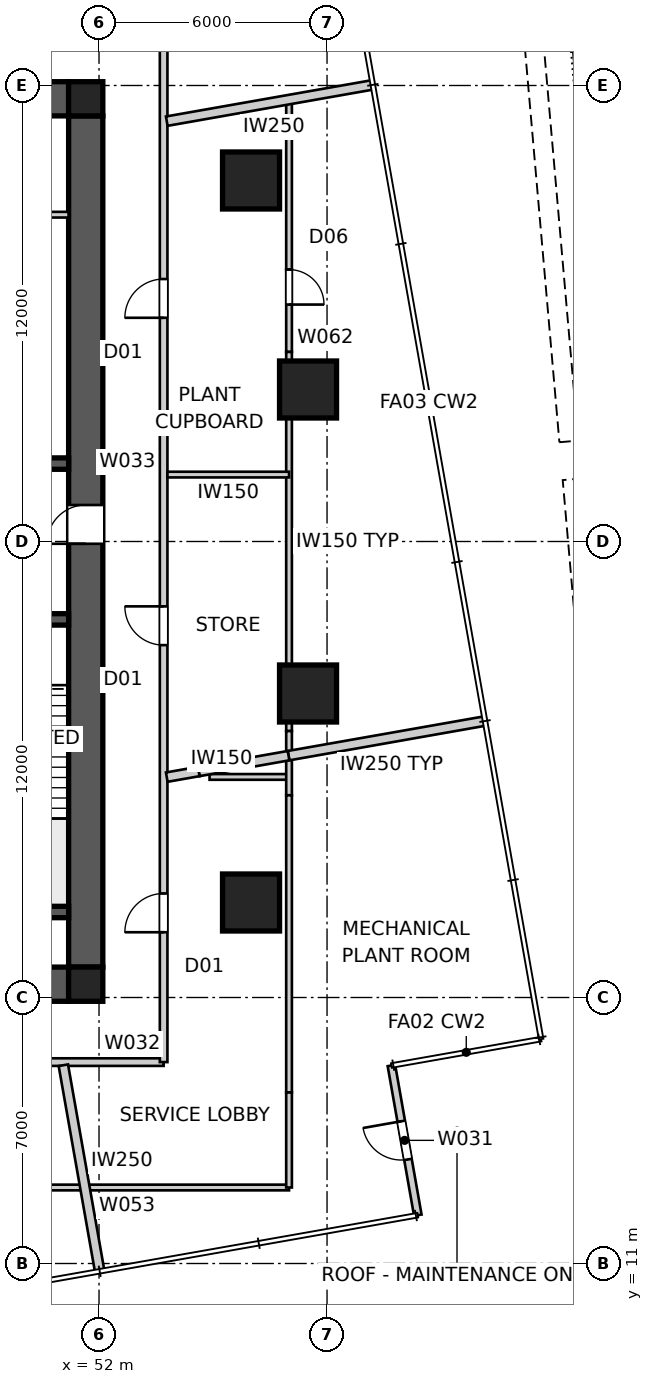
"""IFC4 building model, lengths in metres.
Left out: names, types, materials, properties, quantities, classifications, styles, units other than length and angle.
Written with IfcOpenShell. Run it as: python <this file> out.ifc"""

import sys

from ifc_helpers import new_model, si_unit, direction, frame, frame_2d, origin, origin_2d, place, context, subcontext, project, spatial, polyline, rectangle, outline, extrude, element, fill, save


model = new_model("IFC4")
c1 = context("Model", 3, precision=1e-05, world=origin(), true_north=direction((0.0, 1.0)))
c2 = subcontext(c1, "Body", "Model", "MODEL_VIEW")
j1 = project(units=[si_unit("LENGTHUNIT", "METRE"), si_unit("PLANEANGLEUNIT", "RADIAN")], contexts=[c1])
p1 = place(None, origin())
s1 = spatial("IfcSite", under=j1, at=p1, CompositionType="ELEMENT")
p2 = place(p1, origin())
s2 = spatial("IfcBuilding", under=s1, at=p2, CompositionType="ELEMENT")
p3 = place(p2, frame((0.0, 0.0, 74.4)))
s3 = spatial("IfcBuildingStorey", under=s2, at=p3, CompositionType="ELEMENT", Elevation=74.4)
for number, where, z_axis, x_axis in (
    (1, (28.8, 41.65, 0.0), (0.0, 0.0, 1.0), (1.0, 0.0, 0.0)),
    (2, (51.2, 18.35, 0.0), (0.0, 0.0, 1.0), (-1.0, 0.0, 0.0)),
):
    element("IfcWall", number, at=place(p3, frame(where, z_axis=z_axis, x_axis=x_axis)), inside=s3, PredefinedType="SHEAR", context=c2, shape_type="SweptSolid", body=[
        extrude(outline(polyline([(0.0, -0.45), (22.4, -0.45), (22.4, -0.025), (22.85, -0.025), (22.85, 0.025), (22.4, 0.025), (22.4, 0.45), (0.0, 0.45), (0.0, 0.025), (-0.45, 0.025), (-0.45, -0.025), (0.0, -0.025), (0.0, -0.45)])), origin(), (0.0, 0.0, 1.0), 5.0),
    ])
p4 = place(p3, frame((51.65, 18.8, 0.0), z_axis=(0.0, 0.0, 1.0), x_axis=(0.0, 1.0, 0.0)))
e3 = element("IfcWall", 3, at=p4, inside=s3, PredefinedType="SHEAR", context=c2, shape_type="SweptSolid", body=[
    extrude(outline(polyline([(0.0, -0.45), (22.4, -0.45), (22.4, -0.025), (22.85, -0.025), (22.85, 0.025), (22.4, 0.025), (22.4, 0.45), (0.0, 0.45), (0.0, 0.025), (-0.45, 0.025), (-0.45, -0.025), (0.0, -0.025), (0.0, -0.45)])), origin(), (0.0, 0.0, 1.0), 5.0),
])
p5 = place(p4, frame((11.14, 0.0, 0.0)))
e4 = element("IfcOpeningElement", 4, at=p5, cuts=e3, PredefinedType="OPENING", context=c2, shape_type="SweptSolid", body=[
    extrude(rectangle(XDim=1.02, YDim=2.4, at=frame_2d((0.51, 1.2))), frame((0.0, 0.46, 0.0), z_axis=(0.0, -1.0, 0.0), x_axis=(1.0, 0.0, 0.0)), (0.0, 0.0, 1.0), 0.92),
])
p6 = place(p3, frame((28.8, 32.05, 0.0), z_axis=(0.0, 0.0, 1.0), x_axis=(1.0, 0.0, 0.0)))
e5 = element("IfcWall", 5, at=p6, inside=s3, PredefinedType="SHEAR", context=c2, shape_type="SweptSolid", body=[
    extrude(rectangle(XDim=22.4, YDim=0.3, at=frame_2d((11.2, 0.0))), origin(), (0.0, 0.0, 1.0), 5.0),
])
p7 = place(p6, frame((19.04, 0.0, 0.0)))
e6 = element("IfcOpeningElement", 6, at=p7, cuts=e5, PredefinedType="OPENING", context=c2, shape_type="SweptSolid", body=[
    extrude(rectangle(XDim=0.92, YDim=2.1, at=frame_2d((0.46, 1.05))), frame((0.0, 0.16, 0.0), z_axis=(0.0, -1.0, 0.0), x_axis=(1.0, 0.0, 0.0)), (0.0, 0.0, 1.0), 0.32),
])
p8 = place(p6, frame((1.265, 0.0, 0.0)))
e7 = element("IfcOpeningElement", 7, at=p8, cuts=e5, PredefinedType="OPENING", context=c2, shape_type="SweptSolid", body=[
    extrude(rectangle(XDim=1.02, YDim=2.1, at=frame_2d((0.51, 1.05))), frame((0.0, 0.16, 0.0), z_axis=(0.0, -1.0, 0.0), x_axis=(1.0, 0.0, 0.0)), (0.0, 0.0, 1.0), 0.32),
])
p9 = place(p6, frame((4.015, 0.0, 0.0)))
e8 = element("IfcOpeningElement", 8, at=p9, cuts=e5, PredefinedType="OPENING", context=c2, shape_type="SweptSolid", body=[
    extrude(rectangle(XDim=0.92, YDim=2.1, at=frame_2d((0.46, 1.05))), frame((0.0, 0.16, 0.0), z_axis=(0.0, -1.0, 0.0), x_axis=(1.0, 0.0, 0.0)), (0.0, 0.0, 1.0), 0.32),
])
p10 = place(p6, frame((6.45, 0.0, 0.0)))
e9 = element("IfcOpeningElement", 9, at=p10, cuts=e5, PredefinedType="OPENING", context=c2, shape_type="SweptSolid", body=[
    extrude(rectangle(XDim=1.1, YDim=2.1, at=frame_2d((0.55, 1.05))), frame((0.0, 0.16, 0.0), z_axis=(0.0, -1.0, 0.0), x_axis=(1.0, 0.0, 0.0)), (0.0, 0.0, 1.0), 0.32),
])
p11 = place(p6, frame((9.25, 0.0, 0.0)))
e10 = element("IfcOpeningElement", 10, at=p11, cuts=e5, PredefinedType="OPENING", context=c2, shape_type="SweptSolid", body=[
    extrude(rectangle(XDim=1.1, YDim=2.1, at=frame_2d((0.55, 1.05))), frame((0.0, 0.16, 0.0), z_axis=(0.0, -1.0, 0.0), x_axis=(1.0, 0.0, 0.0)), (0.0, 0.0, 1.0), 0.32),
])
p12 = place(p6, frame((14.85, 0.0, 0.0)))
e11 = element("IfcOpeningElement", 11, at=p12, cuts=e5, PredefinedType="OPENING", context=c2, shape_type="SweptSolid", body=[
    extrude(rectangle(XDim=1.1, YDim=2.1, at=frame_2d((0.55, 1.05))), frame((0.0, 0.16, 0.0), z_axis=(0.0, -1.0, 0.0), x_axis=(1.0, 0.0, 0.0)), (0.0, 0.0, 1.0), 0.32),
])
p13 = place(p3, frame((51.2, 27.95, 0.0), z_axis=(0.0, 0.0, 1.0), x_axis=(-1.0, 0.0, 0.0)))
e12 = element("IfcWall", 12, at=p13, inside=s3, PredefinedType="SHEAR", context=c2, shape_type="SweptSolid", body=[
    extrude(rectangle(XDim=22.4, YDim=0.3, at=frame_2d((11.2, 0.0))), origin(), (0.0, 0.0, 1.0), 5.0),
])
p14 = place(p13, frame((19.04, 0.0, 0.0)))
e13 = element("IfcOpeningElement", 13, at=p14, cuts=e12, PredefinedType="OPENING", context=c2, shape_type="SweptSolid", body=[
    extrude(rectangle(XDim=0.92, YDim=2.1, at=frame_2d((0.46, 1.05))), frame((0.0, 0.16, 0.0), z_axis=(0.0, -1.0, 0.0), x_axis=(1.0, 0.0, 0.0)), (0.0, 0.0, 1.0), 0.32),
])
p15 = place(p13, frame((1.265, 0.0, 0.0)))
e14 = element("IfcOpeningElement", 14, at=p15, cuts=e12, PredefinedType="OPENING", context=c2, shape_type="SweptSolid", body=[
    extrude(rectangle(XDim=1.02, YDim=2.1, at=frame_2d((0.51, 1.05))), frame((0.0, 0.16, 0.0), z_axis=(0.0, -1.0, 0.0), x_axis=(1.0, 0.0, 0.0)), (0.0, 0.0, 1.0), 0.32),
])
p16 = place(p13, frame((4.015, 0.0, 0.0)))
e15 = element("IfcOpeningElement", 15, at=p16, cuts=e12, PredefinedType="OPENING", context=c2, shape_type="SweptSolid", body=[
    extrude(rectangle(XDim=0.92, YDim=2.1, at=frame_2d((0.46, 1.05))), frame((0.0, 0.16, 0.0), z_axis=(0.0, -1.0, 0.0), x_axis=(1.0, 0.0, 0.0)), (0.0, 0.0, 1.0), 0.32),
])
p17 = place(p13, frame((14.85, 0.0, 0.0)))
e16 = element("IfcOpeningElement", 16, at=p17, cuts=e12, PredefinedType="OPENING", context=c2, shape_type="SweptSolid", body=[
    extrude(rectangle(XDim=1.1, YDim=2.1, at=frame_2d((0.55, 1.05))), frame((0.0, 0.16, 0.0), z_axis=(0.0, -1.0, 0.0), x_axis=(1.0, 0.0, 0.0)), (0.0, 0.0, 1.0), 0.32),
])
p18 = place(p3, frame((51.2, 20.25, 0.0), z_axis=(0.0, 0.0, 1.0), x_axis=(-1.0, 0.0, 0.0)))
e17 = element("IfcWall", 17, at=p18, inside=s3, PredefinedType="SHEAR", context=c2, shape_type="SweptSolid", body=[
    extrude(rectangle(XDim=3.5, YDim=0.3, at=frame_2d((1.75, 0.0))), origin(), (0.0, 0.0, 1.0), 5.0),
])
for number, where, z_axis, x_axis in (
    (18, (51.65, 18.35, 0.0), (0.0, 0.0, 1.0), (1.0, 0.0, 0.0)),
    (19, (51.65, 41.65, 0.0), (0.0, 0.0, 1.0), (1.0, 0.0, 0.0)),
):
    element("IfcColumn", number, at=place(p3, frame(where, z_axis=z_axis, x_axis=x_axis)), inside=s3, PredefinedType="COLUMN", context=c2, shape_type="SweptSolid", body=[
        extrude(rectangle(XDim=0.9, YDim=0.9, at=origin_2d()), origin(), (0.0, 0.0, 1.0), 5.0),
    ])
for number, where, z_axis, x_axis in (
    (20, (57.5, 26.0, 0.0), (0.0, 0.0, 1.0), (1.0, 0.0, 0.0)),
    (21, (57.5, 34.0, 0.0), (0.0, 0.0, 1.0), (1.0, 0.0, 0.0)),
    (22, (56.0, 39.5, 0.0), (0.0, 0.0, 1.0), (1.0, 0.0, 0.0)),
    (23, (56.0, 20.5, 0.0), (0.0, 0.0, 1.0), (1.0, 0.0, 0.0)),
):
    element("IfcColumn", number, at=place(p3, frame(where, z_axis=z_axis, x_axis=x_axis)), inside=s3, PredefinedType="COLUMN", context=c2, shape_type="SweptSolid", body=[
        extrude(rectangle(XDim=1.5, YDim=1.5, at=origin_2d()), origin(), (0.0, 0.0, 1.0), 5.0),
    ])
p19 = place(p3, frame((60.388, 12.271, 0.0), z_axis=(0.0, 0.0, 1.0), x_axis=(-0.173646056486, 0.984808127031, 0.0)))
e24 = element("IfcWall", 24, at=p19, inside=s3, PredefinedType="SOLIDWALL", context=c2, shape_type="SweptSolid", body=[
    extrude(rectangle(XDim=4.0, YDim=0.2, at=frame_2d((2.0, 0.0))), origin(), (0.0, 0.0, 1.0), 4.85),
])
p20 = place(p19, frame((1.49, 0.0, 0.0)))
e25 = element("IfcOpeningElement", 25, at=p20, cuts=e24, PredefinedType="OPENING", context=c2, shape_type="SweptSolid", body=[
    extrude(rectangle(XDim=1.02, YDim=2.1, at=frame_2d((0.51, 1.05))), frame((0.0, 0.11, 0.0), z_axis=(0.0, -1.0, 0.0), x_axis=(1.0, 0.0, 0.0)), (0.0, 0.0, 1.0), 0.22),
])
p21 = place(p3, frame((26.3, 16.3, 0.0), z_axis=(0.0, 0.0, 1.0), x_axis=(1.0, 0.0, 0.0)))
e26 = element("IfcWall", 26, at=p21, inside=s3, PredefinedType="PARTITIONING", context=c2, shape_type="SweptSolid", body=[
    extrude(rectangle(XDim=27.4, YDim=0.2, at=frame_2d((13.7, 0.0))), origin(), (0.0, 0.0, 1.0), 4.85),
])
p22 = place(p21, frame((20.916, 0.0, 0.0)))
e27 = element("IfcOpeningElement", 27, at=p22, cuts=e26, PredefinedType="OPENING", context=c2, shape_type="SweptSolid", body=[
    extrude(rectangle(XDim=1.02, YDim=2.34, at=frame_2d((0.51, 1.17))), frame((0.0, 0.11, 0.0), z_axis=(0.0, -1.0, 0.0), x_axis=(1.0, 0.0, 0.0)), (0.0, 0.0, 1.0), 0.22),
])
p23 = place(p21, frame((9.684, 0.0, 0.0)))
e28 = element("IfcOpeningElement", 28, at=p23, cuts=e26, PredefinedType="OPENING", context=c2, shape_type="SweptSolid", body=[
    extrude(rectangle(XDim=1.02, YDim=2.34, at=frame_2d((0.51, 1.17))), frame((0.0, 0.11, 0.0), z_axis=(0.0, -1.0, 0.0), x_axis=(1.0, 0.0, 0.0)), (0.0, 0.0, 1.0), 0.22),
])
p24 = place(p21, frame((15.011, 0.0, 0.0)))
e29 = element("IfcOpeningElement", 29, at=p24, cuts=e26, PredefinedType="OPENING", context=c2, shape_type="SweptSolid", body=[
    extrude(rectangle(XDim=1.02, YDim=2.34, at=frame_2d((0.51, 1.17))), frame((0.0, 0.11, 0.0), z_axis=(0.0, -1.0, 0.0), x_axis=(1.0, 0.0, 0.0)), (0.0, 0.0, 1.0), 0.22),
])
p25 = place(p21, frame((2.604, 0.0, 0.0)))
e30 = element("IfcOpeningElement", 30, at=p25, cuts=e26, PredefinedType="OPENING", context=c2, shape_type="SweptSolid", body=[
    extrude(rectangle(XDim=1.02, YDim=2.34, at=frame_2d((0.51, 1.17))), frame((0.0, 0.11, 0.0), z_axis=(0.0, -1.0, 0.0), x_axis=(1.0, 0.0, 0.0)), (0.0, 0.0, 1.0), 0.22),
])
p26 = place(p21, frame((5.968, 0.0, 0.0)))
e31 = element("IfcOpeningElement", 31, at=p26, cuts=e26, PredefinedType="OPENING", context=c2, shape_type="SweptSolid", body=[
    extrude(rectangle(XDim=1.02, YDim=2.34, at=frame_2d((0.51, 1.17))), frame((0.0, 0.11, 0.0), z_axis=(0.0, -1.0, 0.0), x_axis=(1.0, 0.0, 0.0)), (0.0, 0.0, 1.0), 0.22),
])
p27 = place(p3, frame((53.7, 16.3, 0.0), z_axis=(0.0, 0.0, 1.0), x_axis=(0.0, 1.0, 0.0)))
e32 = element("IfcWall", 32, at=p27, inside=s3, PredefinedType="PARTITIONING", context=c2, shape_type="SweptSolid", body=[
    extrude(rectangle(XDim=27.4, YDim=0.2, at=frame_2d((13.7, 0.0))), origin(), (0.0, 0.0, 1.0), 4.85),
])
p28 = place(p27, frame((19.587, 0.0, 0.0)))
e33 = element("IfcOpeningElement", 33, at=p28, cuts=e32, PredefinedType="OPENING", context=c2, shape_type="SweptSolid", body=[
    extrude(rectangle(XDim=1.02, YDim=2.34, at=frame_2d((0.51, 1.17))), frame((0.0, 0.11, 0.0), z_axis=(0.0, -1.0, 0.0), x_axis=(1.0, 0.0, 0.0)), (0.0, 0.0, 1.0), 0.22),
])
p29 = place(p27, frame((10.973, 0.0, 0.0)))
e34 = element("IfcOpeningElement", 34, at=p29, cuts=e32, PredefinedType="OPENING", context=c2, shape_type="SweptSolid", body=[
    extrude(rectangle(XDim=1.02, YDim=2.34, at=frame_2d((0.51, 1.17))), frame((0.0, 0.11, 0.0), z_axis=(0.0, -1.0, 0.0), x_axis=(1.0, 0.0, 0.0)), (0.0, 0.0, 1.0), 0.22),
])
p30 = place(p27, frame((3.417, 0.0, 0.0)))
e35 = element("IfcOpeningElement", 35, at=p30, cuts=e32, PredefinedType="OPENING", context=c2, shape_type="SweptSolid", body=[
    extrude(rectangle(XDim=1.02, YDim=2.34, at=frame_2d((0.51, 1.17))), frame((0.0, 0.11, 0.0), z_axis=(0.0, -1.0, 0.0), x_axis=(1.0, 0.0, 0.0)), (0.0, 0.0, 1.0), 0.22),
])
p31 = place(p3, frame((52.018, 10.795, 0.0), z_axis=(0.0, 0.0, 1.0), x_axis=(-0.173674040102, 0.984803192417, 0.0)))
e36 = element("IfcWall", 36, at=p31, inside=s3, PredefinedType="PARTITIONING", context=c2, shape_type="SweptSolid", body=[
    extrude(rectangle(XDim=5.506, YDim=0.25, at=frame_2d((2.753, 0.0))), origin(), (0.0, 0.0, 1.0), 4.85),
])
p32 = place(p3, frame((62.157, 25.276, 0.0), z_axis=(0.0, 0.0, 1.0), x_axis=(-0.984813509266, -0.173615529166, 0.0)))
e37 = element("IfcWall", 37, at=p32, inside=s3, PredefinedType="PARTITIONING", context=c2, shape_type="SweptSolid", body=[
    extrude(rectangle(XDim=5.25, YDim=0.25, at=frame_2d((2.625, 0.0))), origin(), (0.0, 0.0, 1.0), 4.85),
])
p33 = place(p3, frame((56.987, 24.364, 0.0), z_axis=(0.0, 0.0, 1.0), x_axis=(-0.984811193906, -0.17362866226, 0.0)))
e38 = element("IfcWall", 38, at=p33, inside=s3, PredefinedType="PARTITIONING", context=c2, shape_type="SweptSolid", body=[
    extrude(rectangle(XDim=2.4, YDim=0.25, at=frame_2d((1.2, 0.0))), origin(), (0.0, 0.0, 1.0), 4.322),
])
p34 = place(p3, frame((54.624, 23.948, 0.0), z_axis=(0.0, 0.0, 1.0), x_axis=(-0.984789312188, -0.173752728326, 0.0)))
e39 = element("IfcWall", 39, at=p34, inside=s3, PredefinedType="PARTITIONING", context=c2, shape_type="SweptSolid", body=[
    extrude(rectangle(XDim=0.854, YDim=0.25, at=frame_2d((0.427, 0.0))), origin(), (0.0, 0.0, 1.0), 4.85),
])
p35 = place(p3, frame((59.205, 42.018, 0.0), z_axis=(0.0, 0.0, 1.0), x_axis=(-0.984803192417, -0.173674040102, 0.0)))
e40 = element("IfcWall", 40, at=p35, inside=s3, PredefinedType="PARTITIONING", context=c2, shape_type="SweptSolid", body=[
    extrude(rectangle(XDim=5.506, YDim=0.25, at=frame_2d((2.753, 0.0))), origin(), (0.0, 0.0, 1.0), 4.85),
])
p36 = place(p3, frame((45.75, 38.6, 0.0), z_axis=(0.0, 0.0, 1.0), x_axis=(1.0, 0.0, 0.0)))
e41 = element("IfcWall", 41, at=p36, inside=s3, PredefinedType="SOLIDWALL", context=c2, shape_type="SweptSolid", body=[
    extrude(rectangle(XDim=5.45, YDim=0.15, at=frame_2d((2.725, 0.0))), origin(), (0.0, 0.0, 1.0), 4.85),
])
p37 = place(p36, frame((2.265, 0.0, 0.0)))
e42 = element("IfcOpeningElement", 42, at=p37, cuts=e41, PredefinedType="OPENING", context=c2, shape_type="SweptSolid", body=[
    extrude(rectangle(XDim=0.92, YDim=2.1, at=frame_2d((0.46, 1.05))), frame((0.0, 0.085, 0.0), z_axis=(0.0, -1.0, 0.0), x_axis=(1.0, 0.0, 0.0)), (0.0, 0.0, 1.0), 0.17),
])
p38 = place(p3, frame((57.0, 13.0, 0.0), z_axis=(0.0, 0.0, 1.0), x_axis=(-1.0, 0.0, 0.0)))
e43 = element("IfcWall", 43, at=p38, inside=s3, PredefinedType="SOLIDWALL", context=c2, shape_type="SweptSolid", body=[
    extrude(rectangle(XDim=10.322, YDim=0.15, at=frame_2d((5.161, 0.0))), origin(), (0.0, 0.0, 1.0), 4.85),
])
p39 = place(p38, frame((8.517, 0.0, 0.0)))
e44 = element("IfcOpeningElement", 44, at=p39, cuts=e43, PredefinedType="OPENING", context=c2, shape_type="SweptSolid", body=[
    extrude(rectangle(XDim=0.92, YDim=2.1, at=frame_2d((0.46, 1.05))), frame((0.0, 0.085, 0.0), z_axis=(0.0, -1.0, 0.0), x_axis=(1.0, 0.0, 0.0)), (0.0, 0.0, 1.0), 0.17),
])
p40 = place(p3, frame((54.908, 23.805, 0.0), z_axis=(0.0, 0.0, 1.0), x_axis=(1.0, 0.0, 0.0)))
e45 = element("IfcWall", 45, at=p40, inside=s3, PredefinedType="SOLIDWALL", context=c2, shape_type="SweptSolid", body=[
    extrude(rectangle(XDim=2.092, YDim=0.15, at=frame_2d((1.046, 0.0))), origin(), (0.0, 0.0, 1.0), 4.85),
])
p41 = place(p3, frame((57.0, 41.629, 0.0), z_axis=(0.0, 0.0, 1.0), x_axis=(0.0, -1.0, 0.0)))
e46 = element("IfcWall", 46, at=p41, inside=s3, PredefinedType="SOLIDWALL", context=c2, shape_type="SweptSolid", body=[
    extrude(rectangle(XDim=4.474, YDim=0.15, at=frame_2d((2.237, 0.0))), origin(), (0.0, 0.0, 1.0), 4.85),
])
p42 = place(p3, frame((57.0, 37.155, 0.0), z_axis=(0.0, 0.0, 1.0), x_axis=(0.0, -1.0, 0.0)))
e47 = element("IfcWall", 47, at=p42, inside=s3, PredefinedType="SOLIDWALL", context=c2, shape_type="SweptSolid", body=[
    extrude(rectangle(XDim=2.167, YDim=0.15, at=frame_2d((1.083, 0.0))), origin(), (0.0, 0.0, 1.0), 3.85),
])
p43 = place(p42, origin())
e48 = element("IfcOpeningElement", 48, at=p43, cuts=e47, PredefinedType="OPENING", context=c2, shape_type="SweptSolid", body=[
    extrude(rectangle(XDim=0.92, YDim=2.1, at=frame_2d((0.46, 1.05))), frame((0.0, 0.085, 0.0), z_axis=(0.0, -1.0, 0.0), x_axis=(1.0, 0.0, 0.0)), (0.0, 0.0, 1.0), 0.17),
])
p44 = place(p3, frame((57.0, 34.988, 0.0), z_axis=(0.0, 0.0, 1.0), x_axis=(0.0, -1.0, 0.0)))
e49 = element("IfcWall", 49, at=p44, inside=s3, PredefinedType="SOLIDWALL", context=c2, shape_type="SweptSolid", body=[
    extrude(rectangle(XDim=9.977, YDim=0.15, at=frame_2d((4.988, 0.0))), origin(), (0.0, 0.0, 1.0), 4.85),
])
p45 = place(p3, frame((57.0, 25.012, 0.0), z_axis=(0.0, 0.0, 1.0), x_axis=(0.0, -1.0, 0.0)))
e50 = element("IfcWall", 50, at=p45, inside=s3, PredefinedType="SOLIDWALL", context=c2, shape_type="SweptSolid", body=[
    extrude(rectangle(XDim=1.69, YDim=0.15, at=frame_2d((0.845, 0.0))), origin(), (0.0, 0.0, 1.0), 3.85),
])
p46 = place(p3, frame((57.0, 23.322, 0.0), z_axis=(0.0, 0.0, 1.0), x_axis=(0.0, -1.0, 0.0)))
e51 = element("IfcWall", 51, at=p46, inside=s3, PredefinedType="SOLIDWALL", context=c2, shape_type="SweptSolid", body=[
    extrude(rectangle(XDim=7.821, YDim=0.15, at=frame_2d((3.911, 0.0))), origin(), (0.0, 0.0, 1.0), 4.85),
])
p47 = place(p3, frame((57.0, 15.5, 0.0), z_axis=(0.0, 0.0, 1.0), x_axis=(0.0, -1.0, 0.0)))
e52 = element("IfcWall", 52, at=p47, inside=s3, PredefinedType="SOLIDWALL", context=c2, shape_type="SweptSolid", body=[
    extrude(rectangle(XDim=2.5, YDim=0.15, at=frame_2d((1.25, 0.0))), origin(), (0.0, 0.0, 1.0), 4.049),
])
p48 = place(p3, frame((57.0, 31.761, 0.0), z_axis=(0.0, 0.0, 1.0), x_axis=(-1.0, 0.0, 0.0)))
e53 = element("IfcWall", 53, at=p48, inside=s3, PredefinedType="SOLIDWALL", context=c2, shape_type="SweptSolid", body=[
    extrude(rectangle(XDim=3.2, YDim=0.15, at=frame_2d((1.6, 0.0))), origin(), (0.0, 0.0, 1.0), 4.85),
])
p49 = place(p20, origin())
e54 = element("IfcDoor", 54, at=p49, inside=s3, OperationType="SINGLE_SWING_RIGHT", PredefinedType="DOOR", context=c2, shape_type="SweptSolid", body=[
    extrude(rectangle(XDim=1.02, YDim=2.1, at=frame_2d((0.51, 1.05))), frame((0.0, 0.025, 0.0), z_axis=(0.0, -1.0, 0.0), x_axis=(1.0, 0.0, 0.0)), (0.0, 0.0, 1.0), 0.05),
])
fill(e25, e54)
p50 = place(p28, origin())
e55 = element("IfcDoor", 55, at=p50, inside=s3, OperationType="SINGLE_SWING_LEFT", PredefinedType="DOOR", context=c2, shape_type="SweptSolid", body=[
    extrude(rectangle(XDim=1.02, YDim=2.34, at=frame_2d((0.51, 1.17))), frame((0.0, 0.025, 0.0), z_axis=(0.0, -1.0, 0.0), x_axis=(1.0, 0.0, 0.0)), (0.0, 0.0, 1.0), 0.05),
])
fill(e33, e55)
p51 = place(p29, origin())
e56 = element("IfcDoor", 56, at=p51, inside=s3, OperationType="SINGLE_SWING_RIGHT", PredefinedType="DOOR", context=c2, shape_type="SweptSolid", body=[
    extrude(rectangle(XDim=1.02, YDim=2.34, at=frame_2d((0.51, 1.17))), frame((0.0, 0.025, 0.0), z_axis=(0.0, -1.0, 0.0), x_axis=(1.0, 0.0, 0.0)), (0.0, 0.0, 1.0), 0.05),
])
fill(e34, e56)
p52 = place(p30, origin())
e57 = element("IfcDoor", 57, at=p52, inside=s3, OperationType="SINGLE_SWING_LEFT", PredefinedType="DOOR", context=c2, shape_type="SweptSolid", body=[
    extrude(rectangle(XDim=1.02, YDim=2.34, at=frame_2d((0.51, 1.17))), frame((0.0, 0.025, 0.0), z_axis=(0.0, -1.0, 0.0), x_axis=(1.0, 0.0, 0.0)), (0.0, 0.0, 1.0), 0.05),
])
fill(e35, e57)
p53 = place(p43, origin())
e58 = element("IfcDoor", 58, at=p53, inside=s3, OperationType="SINGLE_SWING_RIGHT", PredefinedType="DOOR", context=c2, shape_type="SweptSolid", body=[
    extrude(rectangle(XDim=0.92, YDim=2.1, at=frame_2d((0.46, 1.05))), frame((0.0, 0.025, 0.0), z_axis=(0.0, -1.0, 0.0), x_axis=(1.0, 0.0, 0.0)), (0.0, 0.0, 1.0), 0.05),
])
fill(e48, e58)
p54 = place(p5, origin())
e59 = element("IfcDoor", 59, at=p54, inside=s3, OperationType="SINGLE_SWING_LEFT", PredefinedType="DOOR", context=c2, shape_type="SweptSolid", body=[
    extrude(rectangle(XDim=1.02, YDim=2.4, at=frame_2d((0.51, 1.2))), frame((0.0, 0.025, 0.0), z_axis=(0.0, -1.0, 0.0), x_axis=(1.0, 0.0, 0.0)), (0.0, 0.0, 1.0), 0.05),
])
fill(e4, e59)
save(model, sys.argv[1])
